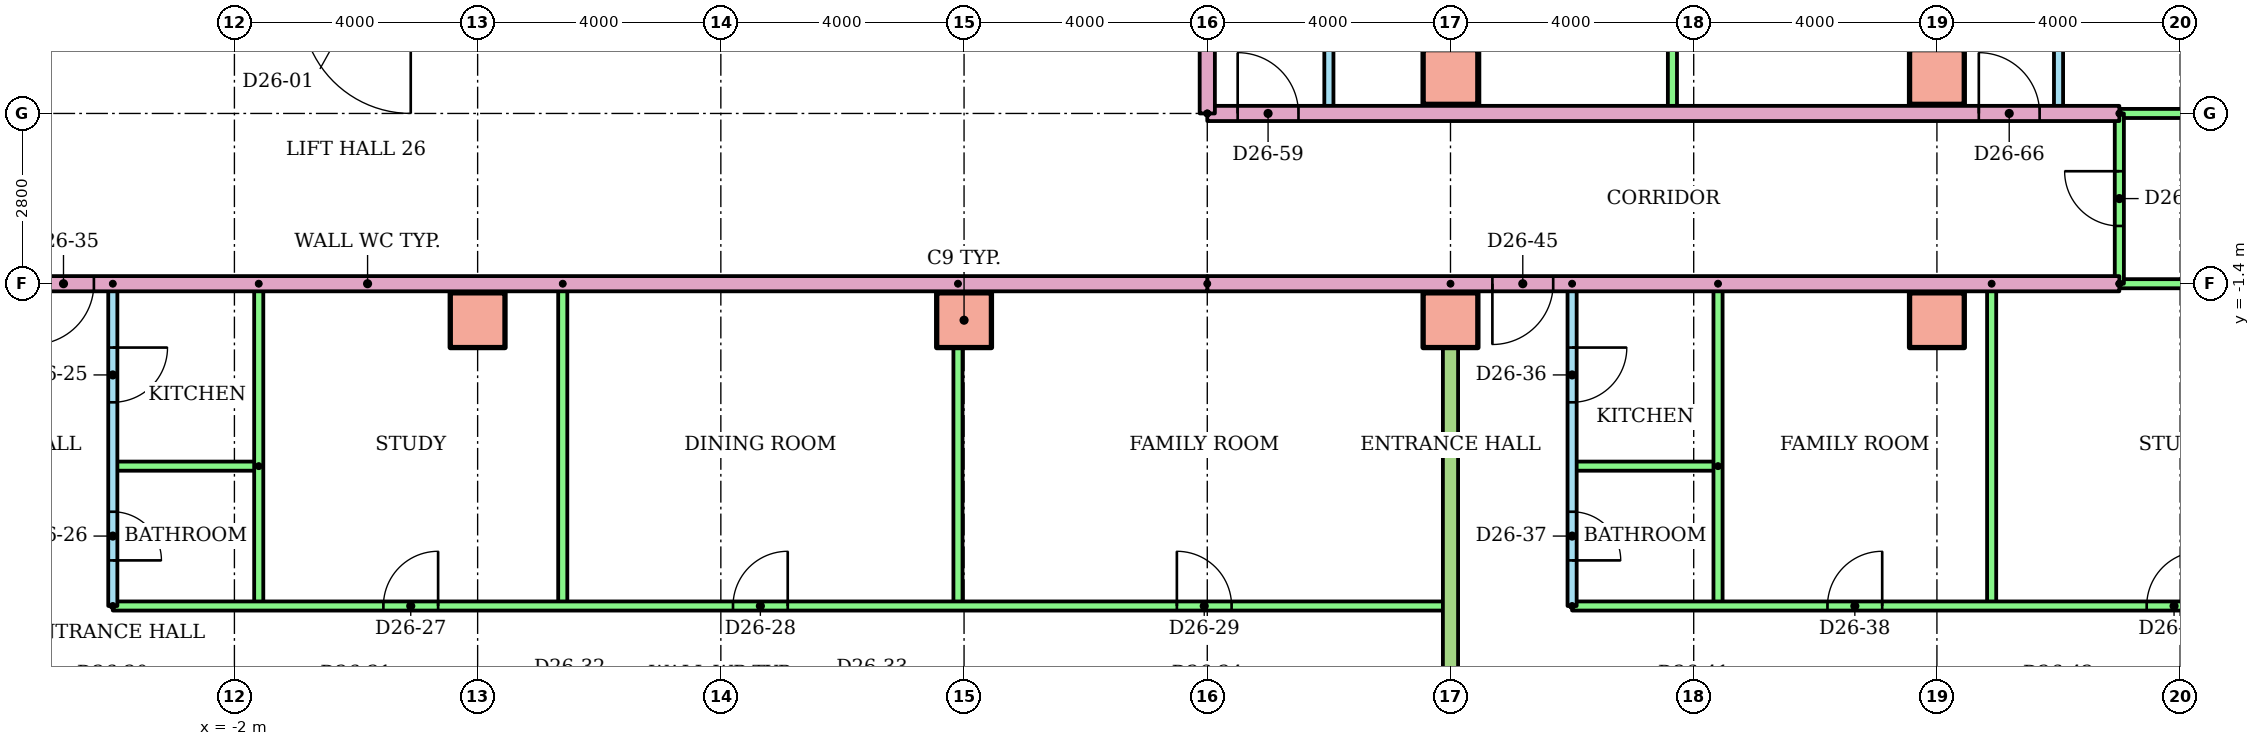
"""IFC4 building model, lengths in metres.
Left out: names, types, materials, properties, quantities, classifications, styles, units other than length and angle.
Written with IfcOpenShell. Run it as: python <this file> out.ifc"""

import sys

from ifc_helpers import new_model, si_unit, direction, frame, frame_2d, origin, origin_2d, place, context, subcontext, project, spatial, rectangle, extrude, element, fill, save


model = new_model("IFC4")
c1 = context("Model", 3, precision=1e-05, world=origin(), true_north=direction((0.0, 1.0)))
c2 = subcontext(c1, "Body", "Model", "MODEL_VIEW")
j1 = project(units=[si_unit("LENGTHUNIT", "METRE"), si_unit("PLANEANGLEUNIT", "RADIAN")], contexts=[c1])
p1 = place(None, origin())
s1 = spatial("IfcSite", under=j1, at=p1, CompositionType="ELEMENT")
p2 = place(p1, origin())
s2 = spatial("IfcBuilding", under=s1, at=p2, CompositionType="ELEMENT")
p3 = place(p2, frame((0.0, 0.0, 99.9)))
s3 = spatial("IfcBuildingStorey", under=s2, at=p3, CompositionType="ELEMENT", Elevation=99.9)
for number, where in (
    (1, (2.0, -2.0, 0.0)),
    (2, (10.0, -2.0, 0.0)),
    (3, (18.0, -2.0, 0.0)),
    (4, (26.0, -2.0, 0.0)),
    (5, (18.0, 2.0, 0.0)),
    (6, (26.0, 2.0, 0.0)),
):
    element("IfcColumn", number, at=place(p3, frame(where)), inside=s3, PredefinedType="COLUMN", context=c2, shape_type="SweptSolid", body=[
        extrude(rectangle(XDim=0.9, YDim=0.9, at=origin_2d()), origin(), (0.0, 0.0, 1.0), 3.2),
    ])
p4 = place(p3, frame((-4.0, -1.4, 0.0), z_axis=(0.0, 0.0, 1.0), x_axis=(0.0, -1.0, 0.0)))
e7 = element("IfcWall", 7, at=p4, inside=s3, PredefinedType="PARTITIONING", context=c2, shape_type="SweptSolid", body=[
    extrude(rectangle(XDim=5.3, YDim=0.15, at=frame_2d((2.65, 0.0))), origin(), (0.0, 0.0, 1.0), 2.4),
])
p5 = place(p4, frame((1.05, 0.0, 0.0)))
e8 = element("IfcOpeningElement", 8, at=p5, cuts=e7, PredefinedType="OPENING", context=c2, shape_type="SweptSolid", body=[
    extrude(rectangle(XDim=0.9, YDim=2.1, at=frame_2d((0.45, 1.05))), frame((0.0, 0.085, 0.0), z_axis=(0.0, -1.0, 0.0), x_axis=(1.0, 0.0, 0.0)), (0.0, 0.0, 1.0), 0.17),
])
p6 = place(p4, frame((3.75, 0.0, 0.0)))
e9 = element("IfcOpeningElement", 9, at=p6, cuts=e7, PredefinedType="OPENING", context=c2, shape_type="SweptSolid", body=[
    extrude(rectangle(XDim=0.8, YDim=2.1, at=frame_2d((0.4, 1.05))), frame((0.0, 0.085, 0.0), z_axis=(0.0, -1.0, 0.0), x_axis=(1.0, 0.0, 0.0)), (0.0, 0.0, 1.0), 0.17),
])
p7 = place(p3, frame((-1.6, -4.4, 0.0), z_axis=(0.0, 0.0, 1.0), x_axis=(-1.0, 0.0, 0.0)))
e10 = element("IfcWall", 10, at=p7, inside=s3, PredefinedType="PARTITIONING", context=c2, shape_type="SweptSolid", body=[
    extrude(rectangle(XDim=2.4, YDim=0.15, at=frame_2d((1.2, 0.0))), origin(), (0.0, 0.0, 1.0), 2.4),
])
for number, where, z_axis, x_axis in (
    (11, (-1.6, -1.4, 0.0), (0.0, 0.0, 1.0), (0.0, -1.0, 0.0)),
    (12, (3.4, -1.4, 0.0), (0.0, 0.0, 1.0), (0.0, -1.0, 0.0)),
    (13, (9.9, -1.4, 0.0), (0.0, 0.0, 1.0), (0.0, -1.0, 0.0)),
):
    element("IfcWall", number, at=place(p3, frame(where, z_axis=z_axis, x_axis=x_axis)), inside=s3, PredefinedType="PARTITIONING", context=c2, shape_type="SweptSolid", body=[
        extrude(rectangle(XDim=5.3, YDim=0.15, at=frame_2d((2.65, 0.0))), origin(), (0.0, 0.0, 1.0), 2.4),
    ])
p8 = place(p3, frame((-4.0, -6.7, 0.0)))
e14 = element("IfcWall", 14, at=p8, inside=s3, PredefinedType="PARTITIONING", context=c2, shape_type="SweptSolid", body=[
    extrude(rectangle(XDim=22.0, YDim=0.15, at=frame_2d((11.0, 0.0))), origin(), (0.0, 0.0, 1.0), 2.4),
])
p9 = place(p8, frame((4.45, 0.0, 0.0)))
e15 = element("IfcOpeningElement", 15, at=p9, cuts=e14, PredefinedType="OPENING", context=c2, shape_type="SweptSolid", body=[
    extrude(rectangle(XDim=0.9, YDim=2.1, at=frame_2d((0.45, 1.05))), frame((0.0, 0.085, 0.0), z_axis=(0.0, -1.0, 0.0), x_axis=(1.0, 0.0, 0.0)), (0.0, 0.0, 1.0), 0.17),
])
p10 = place(p8, frame((10.2, 0.0, 0.0)))
e16 = element("IfcOpeningElement", 16, at=p10, cuts=e14, PredefinedType="OPENING", context=c2, shape_type="SweptSolid", body=[
    extrude(rectangle(XDim=0.9, YDim=2.1, at=frame_2d((0.45, 1.05))), frame((0.0, 0.085, 0.0), z_axis=(0.0, -1.0, 0.0), x_axis=(1.0, 0.0, 0.0)), (0.0, 0.0, 1.0), 0.17),
])
p11 = place(p8, frame((17.5, 0.0, 0.0)))
e17 = element("IfcOpeningElement", 17, at=p11, cuts=e14, PredefinedType="OPENING", context=c2, shape_type="SweptSolid", body=[
    extrude(rectangle(XDim=0.9, YDim=2.1, at=frame_2d((0.45, 1.05))), frame((0.0, 0.085, 0.0), z_axis=(0.0, -1.0, 0.0), x_axis=(1.0, 0.0, 0.0)), (0.0, 0.0, 1.0), 0.17),
])
p12 = place(p3, frame((20.0, -1.4, 0.0), z_axis=(0.0, 0.0, 1.0), x_axis=(0.0, -1.0, 0.0)))
e18 = element("IfcWall", 18, at=p12, inside=s3, PredefinedType="PARTITIONING", context=c2, shape_type="SweptSolid", body=[
    extrude(rectangle(XDim=5.3, YDim=0.15, at=frame_2d((2.65, 0.0))), origin(), (0.0, 0.0, 1.0), 2.4),
])
p13 = place(p12, frame((1.05, 0.0, 0.0)))
e19 = element("IfcOpeningElement", 19, at=p13, cuts=e18, PredefinedType="OPENING", context=c2, shape_type="SweptSolid", body=[
    extrude(rectangle(XDim=0.9, YDim=2.1, at=frame_2d((0.45, 1.05))), frame((0.0, 0.085, 0.0), z_axis=(0.0, -1.0, 0.0), x_axis=(1.0, 0.0, 0.0)), (0.0, 0.0, 1.0), 0.17),
])
p14 = place(p12, frame((3.75, 0.0, 0.0)))
e20 = element("IfcOpeningElement", 20, at=p14, cuts=e18, PredefinedType="OPENING", context=c2, shape_type="SweptSolid", body=[
    extrude(rectangle(XDim=0.8, YDim=2.1, at=frame_2d((0.4, 1.05))), frame((0.0, 0.085, 0.0), z_axis=(0.0, -1.0, 0.0), x_axis=(1.0, 0.0, 0.0)), (0.0, 0.0, 1.0), 0.17),
])
p15 = place(p3, frame((22.4, -4.4, 0.0), z_axis=(0.0, 0.0, 1.0), x_axis=(-1.0, 0.0, 0.0)))
e21 = element("IfcWall", 21, at=p15, inside=s3, PredefinedType="PARTITIONING", context=c2, shape_type="SweptSolid", body=[
    extrude(rectangle(XDim=2.4, YDim=0.15, at=frame_2d((1.2, 0.0))), origin(), (0.0, 0.0, 1.0), 2.4),
])
for number, where, z_axis, x_axis in (
    (22, (22.4, -1.4, 0.0), (0.0, 0.0, 1.0), (0.0, -1.0, 0.0)),
    (23, (26.9, -1.4, 0.0), (0.0, 0.0, 1.0), (0.0, -1.0, 0.0)),
):
    element("IfcWall", number, at=place(p3, frame(where, z_axis=z_axis, x_axis=x_axis)), inside=s3, PredefinedType="PARTITIONING", context=c2, shape_type="SweptSolid", body=[
        extrude(rectangle(XDim=5.3, YDim=0.15, at=frame_2d((2.65, 0.0))), origin(), (0.0, 0.0, 1.0), 2.4),
    ])
p16 = place(p3, frame((20.0, -6.7, 0.0)))
e24 = element("IfcWall", 24, at=p16, inside=s3, PredefinedType="PARTITIONING", context=c2, shape_type="SweptSolid", body=[
    extrude(rectangle(XDim=20.62, YDim=0.15, at=frame_2d((10.31, 0.0))), origin(), (0.0, 0.0, 1.0), 2.4),
])
p17 = place(p16, frame((4.2, 0.0, 0.0)))
e25 = element("IfcOpeningElement", 25, at=p17, cuts=e24, PredefinedType="OPENING", context=c2, shape_type="SweptSolid", body=[
    extrude(rectangle(XDim=0.9, YDim=2.1, at=frame_2d((0.45, 1.05))), frame((0.0, 0.085, 0.0), z_axis=(0.0, -1.0, 0.0), x_axis=(1.0, 0.0, 0.0)), (0.0, 0.0, 1.0), 0.17),
])
p18 = place(p16, frame((9.45, 0.0, 0.0)))
e26 = element("IfcOpeningElement", 26, at=p18, cuts=e24, PredefinedType="OPENING", context=c2, shape_type="SweptSolid", body=[
    extrude(rectangle(XDim=0.9, YDim=2.1, at=frame_2d((0.45, 1.05))), frame((0.0, 0.085, 0.0), z_axis=(0.0, -1.0, 0.0), x_axis=(1.0, 0.0, 0.0)), (0.0, 0.0, 1.0), 0.17),
])
p19 = place(p16, frame((16.2, 0.0, 0.0)))
e27 = element("IfcOpeningElement", 27, at=p19, cuts=e24, PredefinedType="OPENING", context=c2, shape_type="SweptSolid", body=[
    extrude(rectangle(XDim=0.9, YDim=2.1, at=frame_2d((0.45, 1.05))), frame((0.0, 0.085, 0.0), z_axis=(0.0, -1.0, 0.0), x_axis=(1.0, 0.0, 0.0)), (0.0, 0.0, 1.0), 0.17),
])
p20 = place(p3, frame((18.0, -1.4, 0.0), z_axis=(0.0, 0.0, 1.0), x_axis=(0.0, -1.0, 0.0)))
e28 = element("IfcWall", 28, at=p20, inside=s3, PredefinedType="PARTITIONING", context=c2, shape_type="SweptSolid", body=[
    extrude(rectangle(XDim=14.81, YDim=0.25, at=frame_2d((7.405, 0.0))), origin(), (0.0, 0.0, 1.0), 2.4),
])
p21 = place(p3, frame((29.0, -1.4, 0.0), z_axis=(0.0, 0.0, 1.0), x_axis=(-1.0, 0.0, 0.0)))
e29 = element("IfcWall", 29, at=p21, inside=s3, PredefinedType="PARTITIONING", context=c2, shape_type="SweptSolid", body=[
    extrude(rectangle(XDim=15.0, YDim=0.25, at=frame_2d((7.5, 0.0))), origin(), (0.0, 0.0, 1.0), 2.4),
])
p22 = place(p21, frame((9.311, 0.0, 0.0)))
e30 = element("IfcOpeningElement", 30, at=p22, cuts=e29, PredefinedType="OPENING", context=c2, shape_type="SweptSolid", body=[
    extrude(rectangle(XDim=1.0, YDim=2.1, at=frame_2d((0.5, 1.05))), frame((0.0, 0.135, 0.0), z_axis=(0.0, -1.0, 0.0), x_axis=(1.0, 0.0, 0.0)), (0.0, 0.0, 1.0), 0.27),
])
p23 = place(p3, frame((40.62, -1.4, 0.0), z_axis=(0.0, 0.0, 1.0), x_axis=(-1.0, 0.0, 0.0)))
e31 = element("IfcWall", 31, at=p23, inside=s3, PredefinedType="PARTITIONING", context=c2, shape_type="SweptSolid", body=[
    extrude(rectangle(XDim=11.62, YDim=0.15, at=frame_2d((5.81, 0.0))), origin(), (0.0, 0.0, 1.0), 2.4),
])
p24 = place(p3, frame((16.0, 9.1, 0.0), z_axis=(0.0, 0.0, 1.0), x_axis=(0.0, -1.0, 0.0)))
e32 = element("IfcWall", 32, at=p24, inside=s3, PredefinedType="PARTITIONING", context=c2, shape_type="SweptSolid", body=[
    extrude(rectangle(XDim=7.7, YDim=0.15, at=frame_2d((3.85, 0.0))), origin(), (0.0, 0.0, 1.0), 2.4),
])
p25 = place(p24, frame((5.125, 0.0, 0.0)))
e33 = element("IfcOpeningElement", 33, at=p25, cuts=e32, PredefinedType="OPENING", context=c2, shape_type="SweptSolid", body=[
    extrude(rectangle(XDim=0.9, YDim=2.1, at=frame_2d((0.45, 1.05))), frame((0.0, 0.085, 0.0), z_axis=(0.0, -1.0, 0.0), x_axis=(1.0, 0.0, 0.0)), (0.0, 0.0, 1.0), 0.17),
])
p26 = place(p24, frame((1.325, 0.0, 0.0)))
e34 = element("IfcOpeningElement", 34, at=p26, cuts=e32, PredefinedType="OPENING", context=c2, shape_type="SweptSolid", body=[
    extrude(rectangle(XDim=0.8, YDim=2.1, at=frame_2d((0.4, 1.05))), frame((0.0, 0.085, 0.0), z_axis=(0.0, -1.0, 0.0), x_axis=(1.0, 0.0, 0.0)), (0.0, 0.0, 1.0), 0.17),
])
for number, where, z_axis, x_axis in (
    (35, (18.4, 9.1, 0.0), (0.0, 0.0, 1.0), (0.0, -1.0, 0.0)),
    (36, (21.65, 9.1, 0.0), (0.0, 0.0, 1.0), (0.0, -1.0, 0.0)),
):
    element("IfcWall", number, at=place(p3, frame(where, z_axis=z_axis, x_axis=x_axis)), inside=s3, PredefinedType="PARTITIONING", context=c2, shape_type="SweptSolid", body=[
        extrude(rectangle(XDim=7.7, YDim=0.15, at=frame_2d((3.85, 0.0))), origin(), (0.0, 0.0, 1.0), 2.4),
    ])
p27 = place(p3, frame((28.0, 9.1, 0.0), z_axis=(0.0, 0.0, 1.0), x_axis=(0.0, -1.0, 0.0)))
e37 = element("IfcWall", 37, at=p27, inside=s3, PredefinedType="PARTITIONING", context=c2, shape_type="SweptSolid", body=[
    extrude(rectangle(XDim=7.7, YDim=0.15, at=frame_2d((3.85, 0.0))), origin(), (0.0, 0.0, 1.0), 2.4),
])
p28 = place(p27, frame((5.125, 0.0, 0.0)))
e38 = element("IfcOpeningElement", 38, at=p28, cuts=e37, PredefinedType="OPENING", context=c2, shape_type="SweptSolid", body=[
    extrude(rectangle(XDim=0.9, YDim=2.1, at=frame_2d((0.45, 1.05))), frame((0.0, 0.085, 0.0), z_axis=(0.0, -1.0, 0.0), x_axis=(1.0, 0.0, 0.0)), (0.0, 0.0, 1.0), 0.17),
])
p29 = place(p27, frame((1.325, 0.0, 0.0)))
e39 = element("IfcOpeningElement", 39, at=p29, cuts=e37, PredefinedType="OPENING", context=c2, shape_type="SweptSolid", body=[
    extrude(rectangle(XDim=0.8, YDim=2.1, at=frame_2d((0.4, 1.05))), frame((0.0, 0.085, 0.0), z_axis=(0.0, -1.0, 0.0), x_axis=(1.0, 0.0, 0.0)), (0.0, 0.0, 1.0), 0.17),
])
p30 = place(p3, frame((26.0, 18.621, 0.0), z_axis=(0.0, 0.0, 1.0), x_axis=(0.0, -1.0, 0.0)))
e40 = element("IfcWall", 40, at=p30, inside=s3, PredefinedType="PARTITIONING", context=c2, shape_type="SweptSolid", body=[
    extrude(rectangle(XDim=17.221, YDim=0.25, at=frame_2d((8.611, 0.0))), origin(), (0.0, 0.0, 1.0), 2.4),
])
p31 = place(p3, frame((14.0, 1.4, 0.0)))
e41 = element("IfcWall", 41, at=p31, inside=s3, PredefinedType="PARTITIONING", context=c2, shape_type="SweptSolid", body=[
    extrude(rectangle(XDim=15.0, YDim=0.25, at=frame_2d((7.5, 0.0))), origin(), (0.0, 0.0, 1.0), 2.4),
])
p32 = place(p31, frame((0.5, 0.0, 0.0)))
e42 = element("IfcOpeningElement", 42, at=p32, cuts=e41, PredefinedType="OPENING", context=c2, shape_type="SweptSolid", body=[
    extrude(rectangle(XDim=1.0, YDim=2.1, at=frame_2d((0.5, 1.05))), frame((0.0, 0.135, 0.0), z_axis=(0.0, -1.0, 0.0), x_axis=(1.0, 0.0, 0.0)), (0.0, 0.0, 1.0), 0.27),
])
p33 = place(p31, frame((12.689, 0.0, 0.0)))
e43 = element("IfcOpeningElement", 43, at=p33, cuts=e41, PredefinedType="OPENING", context=c2, shape_type="SweptSolid", body=[
    extrude(rectangle(XDim=1.0, YDim=2.1, at=frame_2d((0.5, 1.05))), frame((0.0, 0.135, 0.0), z_axis=(0.0, -1.0, 0.0), x_axis=(1.0, 0.0, 0.0)), (0.0, 0.0, 1.0), 0.27),
])
p34 = place(p3, frame((29.0, 1.4, 0.0)))
e44 = element("IfcWall", 44, at=p34, inside=s3, PredefinedType="PARTITIONING", context=c2, shape_type="SweptSolid", body=[
    extrude(rectangle(XDim=11.62, YDim=0.15, at=frame_2d((5.81, 0.0))), origin(), (0.0, 0.0, 1.0), 2.4),
])
p35 = place(p3, frame((29.0, -1.4, 0.0), z_axis=(0.0, 0.0, 1.0), x_axis=(0.0, 1.0, 0.0)))
e45 = element("IfcWall", 45, at=p35, inside=s3, PredefinedType="PARTITIONING", context=c2, shape_type="SweptSolid", body=[
    extrude(rectangle(XDim=2.8, YDim=0.15, at=frame_2d((1.4, 0.0))), origin(), (0.0, 0.0, 1.0), 2.4),
])
p36 = place(p35, frame((0.95, 0.0, 0.0)))
e46 = element("IfcOpeningElement", 46, at=p36, cuts=e45, PredefinedType="OPENING", context=c2, shape_type="SweptSolid", body=[
    extrude(rectangle(XDim=0.9, YDim=2.1, at=frame_2d((0.45, 1.05))), frame((0.0, 0.085, 0.0), z_axis=(0.0, -1.0, 0.0), x_axis=(1.0, 0.0, 0.0)), (0.0, 0.0, 1.0), 0.17),
])
p37 = place(p3, frame((14.0, -1.4, 0.0), z_axis=(0.0, 0.0, 1.0), x_axis=(-1.0, 0.0, 0.0)))
e47 = element("IfcWall", 47, at=p37, inside=s3, PredefinedType="PARTITIONING", context=c2, shape_type="SweptSolid", body=[
    extrude(rectangle(XDim=28.0, YDim=0.25, at=frame_2d((14.0, 0.0))), origin(), (0.0, 0.0, 1.0), 2.4),
])
p38 = place(p37, frame((20.689, 0.0, 0.0)))
e48 = element("IfcOpeningElement", 48, at=p38, cuts=e47, PredefinedType="OPENING", context=c2, shape_type="SweptSolid", body=[
    extrude(rectangle(XDim=1.0, YDim=2.1, at=frame_2d((0.5, 1.05))), frame((0.0, 0.135, 0.0), z_axis=(0.0, -1.0, 0.0), x_axis=(1.0, 0.0, 0.0)), (0.0, 0.0, 1.0), 0.27),
])
p39 = place(p37, frame((18.311, 0.0, 0.0)))
e49 = element("IfcOpeningElement", 49, at=p39, cuts=e47, PredefinedType="OPENING", context=c2, shape_type="SweptSolid", body=[
    extrude(rectangle(XDim=1.0, YDim=2.1, at=frame_2d((0.5, 1.05))), frame((0.0, 0.135, 0.0), z_axis=(0.0, -1.0, 0.0), x_axis=(1.0, 0.0, 0.0)), (0.0, 0.0, 1.0), 0.27),
])
p40 = place(p3, frame((14.0, 1.4, 0.0), z_axis=(0.0, 0.0, 1.0), x_axis=(0.0, 1.0, 0.0)))
e50 = element("IfcWall", 50, at=p40, inside=s3, PredefinedType="PARTITIONING", context=c2, shape_type="SweptSolid", body=[
    extrude(rectangle(XDim=1.6, YDim=0.25, at=frame_2d((0.8, 0.0))), origin(), (0.0, 0.0, 1.0), 2.4),
])
p41 = place(p5, origin())
e51 = element("IfcDoor", 51, at=p41, inside=s3, OperationType="SINGLE_SWING_LEFT", PredefinedType="DOOR", context=c2, shape_type="SweptSolid", body=[
    extrude(rectangle(XDim=0.9, YDim=2.1, at=frame_2d((0.45, 1.05))), frame((0.0, 0.025, 0.0), z_axis=(0.0, -1.0, 0.0), x_axis=(1.0, 0.0, 0.0)), (0.0, 0.0, 1.0), 0.05),
])
fill(e8, e51)
p42 = place(p6, origin())
e52 = element("IfcDoor", 52, at=p42, inside=s3, OperationType="SINGLE_SWING_RIGHT", PredefinedType="DOOR", context=c2, shape_type="SweptSolid", body=[
    extrude(rectangle(XDim=0.8, YDim=2.1, at=frame_2d((0.4, 1.05))), frame((0.0, 0.025, 0.0), z_axis=(0.0, -1.0, 0.0), x_axis=(1.0, 0.0, 0.0)), (0.0, 0.0, 1.0), 0.05),
])
fill(e9, e52)
p43 = place(p9, origin())
e53 = element("IfcDoor", 53, at=p43, inside=s3, OperationType="SINGLE_SWING_RIGHT", PredefinedType="DOOR", context=c2, shape_type="SweptSolid", body=[
    extrude(rectangle(XDim=0.9, YDim=2.1, at=frame_2d((0.45, 1.05))), frame((0.0, 0.025, 0.0), z_axis=(0.0, -1.0, 0.0), x_axis=(1.0, 0.0, 0.0)), (0.0, 0.0, 1.0), 0.05),
])
fill(e15, e53)
p44 = place(p10, origin())
e54 = element("IfcDoor", 54, at=p44, inside=s3, OperationType="SINGLE_SWING_RIGHT", PredefinedType="DOOR", context=c2, shape_type="SweptSolid", body=[
    extrude(rectangle(XDim=0.9, YDim=2.1, at=frame_2d((0.45, 1.05))), frame((0.0, 0.025, 0.0), z_axis=(0.0, -1.0, 0.0), x_axis=(1.0, 0.0, 0.0)), (0.0, 0.0, 1.0), 0.05),
])
fill(e16, e54)
p45 = place(p11, origin())
e55 = element("IfcDoor", 55, at=p45, inside=s3, OperationType="SINGLE_SWING_LEFT", PredefinedType="DOOR", context=c2, shape_type="SweptSolid", body=[
    extrude(rectangle(XDim=0.9, YDim=2.1, at=frame_2d((0.45, 1.05))), frame((0.0, 0.025, 0.0), z_axis=(0.0, -1.0, 0.0), x_axis=(1.0, 0.0, 0.0)), (0.0, 0.0, 1.0), 0.05),
])
fill(e17, e55)
p46 = place(p39, origin())
e56 = element("IfcDoor", 56, at=p46, inside=s3, OperationType="SINGLE_SWING_RIGHT", PredefinedType="DOOR", context=c2, shape_type="SweptSolid", body=[
    extrude(rectangle(XDim=1.0, YDim=2.1, at=frame_2d((0.5, 1.05))), frame((0.0, 0.025, 0.0), z_axis=(0.0, -1.0, 0.0), x_axis=(1.0, 0.0, 0.0)), (0.0, 0.0, 1.0), 0.05),
])
fill(e49, e56)
p47 = place(p13, origin())
e57 = element("IfcDoor", 57, at=p47, inside=s3, OperationType="SINGLE_SWING_LEFT", PredefinedType="DOOR", context=c2, shape_type="SweptSolid", body=[
    extrude(rectangle(XDim=0.9, YDim=2.1, at=frame_2d((0.45, 1.05))), frame((0.0, 0.025, 0.0), z_axis=(0.0, -1.0, 0.0), x_axis=(1.0, 0.0, 0.0)), (0.0, 0.0, 1.0), 0.05),
])
fill(e19, e57)
p48 = place(p14, origin())
e58 = element("IfcDoor", 58, at=p48, inside=s3, OperationType="SINGLE_SWING_RIGHT", PredefinedType="DOOR", context=c2, shape_type="SweptSolid", body=[
    extrude(rectangle(XDim=0.8, YDim=2.1, at=frame_2d((0.4, 1.05))), frame((0.0, 0.025, 0.0), z_axis=(0.0, -1.0, 0.0), x_axis=(1.0, 0.0, 0.0)), (0.0, 0.0, 1.0), 0.05),
])
fill(e20, e58)
p49 = place(p17, origin())
e59 = element("IfcDoor", 59, at=p49, inside=s3, OperationType="SINGLE_SWING_RIGHT", PredefinedType="DOOR", context=c2, shape_type="SweptSolid", body=[
    extrude(rectangle(XDim=0.9, YDim=2.1, at=frame_2d((0.45, 1.05))), frame((0.0, 0.025, 0.0), z_axis=(0.0, -1.0, 0.0), x_axis=(1.0, 0.0, 0.0)), (0.0, 0.0, 1.0), 0.05),
])
fill(e25, e59)
p50 = place(p18, origin())
e60 = element("IfcDoor", 60, at=p50, inside=s3, OperationType="SINGLE_SWING_RIGHT", PredefinedType="DOOR", context=c2, shape_type="SweptSolid", body=[
    extrude(rectangle(XDim=0.9, YDim=2.1, at=frame_2d((0.45, 1.05))), frame((0.0, 0.025, 0.0), z_axis=(0.0, -1.0, 0.0), x_axis=(1.0, 0.0, 0.0)), (0.0, 0.0, 1.0), 0.05),
])
fill(e26, e60)
p51 = place(p22, origin())
e61 = element("IfcDoor", 61, at=p51, inside=s3, OperationType="SINGLE_SWING_RIGHT", PredefinedType="DOOR", context=c2, shape_type="SweptSolid", body=[
    extrude(rectangle(XDim=1.0, YDim=2.1, at=frame_2d((0.5, 1.05))), frame((0.0, 0.025, 0.0), z_axis=(0.0, -1.0, 0.0), x_axis=(1.0, 0.0, 0.0)), (0.0, 0.0, 1.0), 0.05),
])
fill(e30, e61)
p52 = place(p32, origin())
e62 = element("IfcDoor", 62, at=p52, inside=s3, OperationType="SINGLE_SWING_LEFT", PredefinedType="DOOR", context=c2, shape_type="SweptSolid", body=[
    extrude(rectangle(XDim=1.0, YDim=2.1, at=frame_2d((0.5, 1.05))), frame((0.0, 0.025, 0.0), z_axis=(0.0, -1.0, 0.0), x_axis=(1.0, 0.0, 0.0)), (0.0, 0.0, 1.0), 0.05),
])
fill(e42, e62)
p53 = place(p33, origin())
e63 = element("IfcDoor", 63, at=p53, inside=s3, OperationType="SINGLE_SWING_LEFT", PredefinedType="DOOR", context=c2, shape_type="SweptSolid", body=[
    extrude(rectangle(XDim=1.0, YDim=2.1, at=frame_2d((0.5, 1.05))), frame((0.0, 0.025, 0.0), z_axis=(0.0, -1.0, 0.0), x_axis=(1.0, 0.0, 0.0)), (0.0, 0.0, 1.0), 0.05),
])
fill(e43, e63)
p54 = place(p36, origin())
e64 = element("IfcDoor", 64, at=p54, inside=s3, OperationType="SINGLE_SWING_RIGHT", PredefinedType="DOOR", context=c2, shape_type="SweptSolid", body=[
    extrude(rectangle(XDim=0.9, YDim=2.1, at=frame_2d((0.45, 1.05))), frame((0.0, 0.025, 0.0), z_axis=(0.0, -1.0, 0.0), x_axis=(1.0, 0.0, 0.0)), (0.0, 0.0, 1.0), 0.05),
])
fill(e46, e64)
save(model, sys.argv[1])
